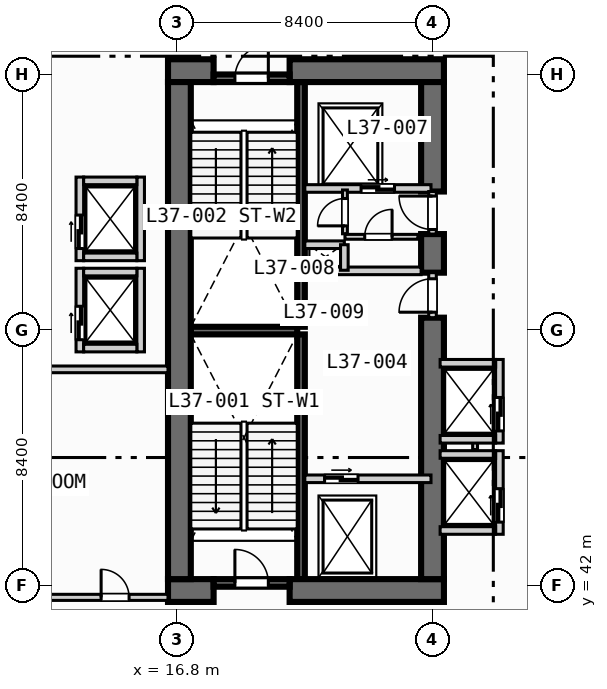
"""IFC4 building model, lengths in metres.
Left out: names, types, materials, properties, quantities, classifications, styles, units other than length and angle.
Written with IfcOpenShell. Run it as: python <this file> out.ifc"""

import sys

from ifc_helpers import new_model, si_unit, direction, frame, frame_2d, origin, place, context, subcontext, project, spatial, rectangle, extrude, element, fill, save


model = new_model("IFC4")
c1 = context("Model", 3, precision=1e-05, world=origin(), true_north=direction((0.0, 1.0)))
c2 = subcontext(c1, "Body", "Model", "MODEL_VIEW")
j1 = project(units=[si_unit("LENGTHUNIT", "METRE"), si_unit("PLANEANGLEUNIT", "RADIAN")], contexts=[c1])
p1 = place(None, origin())
s1 = spatial("IfcSite", under=j1, at=p1, CompositionType="ELEMENT")
p2 = place(p1, origin())
s2 = spatial("IfcBuilding", under=s1, at=p2, CompositionType="ELEMENT")
p3 = place(p2, frame((0.0, 0.0, 153.2)))
s3 = spatial("IfcBuildingStorey", under=s2, at=p3, CompositionType="ELEMENT", Elevation=153.2)
for number, where, z_axis, x_axis in (
    (1, (20.875, 42.2, 0.0), (0.0, 0.0, 1.0), (0.0, 1.0, 0.0)),
    (2, (20.875, 50.5, 0.0), (0.0, 0.0, 1.0), (0.0, 1.0, 0.0)),
):
    element("IfcWall", number, at=place(p3, frame(where, z_axis=z_axis, x_axis=x_axis)), inside=s3, PredefinedType="SOLIDWALL", context=c2, shape_type="SweptSolid", body=[
        extrude(rectangle(XDim=8.05, YDim=0.25, at=frame_2d((4.025, 0.0))), origin(), (0.0, 0.0, 1.0), 4.15),
    ])
p4 = place(p3, frame((17.25, 50.375, 0.0), z_axis=(0.0, 0.0, 1.0), x_axis=(1.0, 0.0, 0.0)))
e3 = element("IfcWall", 3, at=p4, inside=s3, PredefinedType="SOLIDWALL", context=c2, shape_type="SweptSolid", body=[
    extrude(rectangle(XDim=3.5, YDim=0.25, at=frame_2d((1.75, 0.0))), origin(), (0.0, 0.0, 1.0), 4.15),
])
p5 = place(p3, frame((16.5, 41.825, 0.0), z_axis=(0.0, 0.0, 1.0), x_axis=(1.0, 0.0, 0.0)))
e4 = element("IfcWall", 4, at=p5, inside=s3, PredefinedType="SHEAR", context=c2, shape_type="SweptSolid", body=[
    extrude(rectangle(XDim=1.5, YDim=0.75, at=frame_2d((0.75, 0.0))), origin(), (0.0, 0.0, 1.0), 4.15),
])
p6 = place(p3, frame((20.5, 41.825, 0.0), z_axis=(0.0, 0.0, 1.0), x_axis=(1.0, 0.0, 0.0)))
e5 = element("IfcWall", 5, at=p6, inside=s3, PredefinedType="SHEAR", context=c2, shape_type="SweptSolid", body=[
    extrude(rectangle(XDim=5.075, YDim=0.75, at=frame_2d((2.538, 0.0))), origin(), (0.0, 0.0, 1.0), 4.15),
])
p7 = place(p3, frame((16.5, 58.925, 0.0), z_axis=(0.0, 0.0, 1.0), x_axis=(1.0, 0.0, 0.0)))
e6 = element("IfcWall", 6, at=p7, inside=s3, PredefinedType="SHEAR", context=c2, shape_type="SweptSolid", body=[
    extrude(rectangle(XDim=1.5, YDim=0.75, at=frame_2d((0.75, 0.0))), origin(), (0.0, 0.0, 1.0), 4.15),
])
p8 = place(p3, frame((20.5, 58.925, 0.0), z_axis=(0.0, 0.0, 1.0), x_axis=(1.0, 0.0, 0.0)))
e7 = element("IfcWall", 7, at=p8, inside=s3, PredefinedType="SHEAR", context=c2, shape_type="SweptSolid", body=[
    extrude(rectangle(XDim=5.075, YDim=0.75, at=frame_2d((2.538, 0.0))), origin(), (0.0, 0.0, 1.0), 4.15),
])
p9 = place(p3, frame((16.875, 42.2, 0.0), z_axis=(0.0, 0.0, 1.0), x_axis=(0.0, 1.0, 0.0)))
e8 = element("IfcWall", 8, at=p9, inside=s3, PredefinedType="SHEAR", context=c2, shape_type="SweptSolid", body=[
    extrude(rectangle(XDim=16.35, YDim=0.75, at=frame_2d((8.175, 0.0))), origin(), (0.0, 0.0, 1.0), 4.15),
])
p10 = place(p3, frame((25.2, 42.2, 0.0), z_axis=(0.0, 0.0, 1.0), x_axis=(0.0, 1.0, 0.0)))
e9 = element("IfcWall", 9, at=p10, inside=s3, PredefinedType="SHEAR", context=c2, shape_type="SweptSolid", body=[
    extrude(rectangle(XDim=8.6, YDim=0.75, at=frame_2d((4.3, 0.0))), origin(), (0.0, 0.0, 1.0), 4.15),
])
p11 = place(p3, frame((25.2, 52.28, 0.0), z_axis=(0.0, 0.0, 1.0), x_axis=(0.0, 1.0, 0.0)))
e10 = element("IfcWall", 10, at=p11, inside=s3, PredefinedType="SHEAR", context=c2, shape_type="SweptSolid", body=[
    extrude(rectangle(XDim=1.27, YDim=0.75, at=frame_2d((0.635, 0.0))), origin(), (0.0, 0.0, 1.0), 4.15),
])
p12 = place(p3, frame((25.2, 54.95, 0.0), z_axis=(0.0, 0.0, 1.0), x_axis=(0.0, 1.0, 0.0)))
e11 = element("IfcWall", 11, at=p12, inside=s3, PredefinedType="SHEAR", context=c2, shape_type="SweptSolid", body=[
    extrude(rectangle(XDim=3.6, YDim=0.75, at=frame_2d((1.8, 0.0))), origin(), (0.0, 0.0, 1.0), 4.15),
])
p13 = place(p3, frame((18.0, 42.075, 0.0), z_axis=(0.0, 0.0, 1.0), x_axis=(1.0, 0.0, 0.0)))
e12 = element("IfcWall", 12, at=p13, inside=s3, PredefinedType="SOLIDWALL", context=c2, shape_type="SweptSolid", body=[
    extrude(rectangle(XDim=2.5, YDim=0.25, at=frame_2d((1.25, 0.0))), origin(), (0.0, 0.0, 1.0), 4.15),
])
p14 = place(p13, frame((0.7, 0.0, 0.0)))
e13 = element("IfcOpeningElement", 13, at=p14, cuts=e12, PredefinedType="OPENING", context=c2, shape_type="SweptSolid", body=[
    extrude(rectangle(XDim=1.1, YDim=2.15, at=frame_2d((0.55, 1.075))), frame((0.0, 0.135, 0.0), z_axis=(0.0, -1.0, 0.0), x_axis=(1.0, 0.0, 0.0)), (0.0, 0.0, 1.0), 0.27),
])
p15 = place(p3, frame((18.0, 58.675, 0.0), z_axis=(0.0, 0.0, 1.0), x_axis=(1.0, 0.0, 0.0)))
e14 = element("IfcWall", 14, at=p15, inside=s3, PredefinedType="SOLIDWALL", context=c2, shape_type="SweptSolid", body=[
    extrude(rectangle(XDim=2.5, YDim=0.25, at=frame_2d((1.25, 0.0))), origin(), (0.0, 0.0, 1.0), 4.15),
])
p16 = place(p15, frame((0.7, 0.0, 0.0)))
e15 = element("IfcOpeningElement", 15, at=p16, cuts=e14, PredefinedType="OPENING", context=c2, shape_type="SweptSolid", body=[
    extrude(rectangle(XDim=1.1, YDim=2.15, at=frame_2d((0.55, 1.075))), frame((0.0, 0.135, 0.0), z_axis=(0.0, -1.0, 0.0), x_axis=(1.0, 0.0, 0.0)), (0.0, 0.0, 1.0), 0.27),
])
p17 = place(p3, frame((21.0, 45.5, 0.0), z_axis=(0.0, 0.0, 1.0), x_axis=(1.0, 0.0, 0.0)))
e16 = element("IfcWall", 16, at=p17, inside=s3, PredefinedType="SOLIDWALL", context=c2, shape_type="SweptSolid", body=[
    extrude(rectangle(XDim=4.15, YDim=0.25, at=frame_2d((2.075, 0.0))), origin(), (0.0, 0.0, 1.0), 4.15),
])
p18 = place(p17, frame((0.65, 0.0, 0.0)))
e17 = element("IfcOpeningElement", 17, at=p18, cuts=e16, PredefinedType="OPENING", context=c2, shape_type="SweptSolid", body=[
    extrude(rectangle(XDim=1.1, YDim=2.15, at=frame_2d((0.55, 1.075))), frame((0.0, 0.135, 0.0), z_axis=(0.0, -1.0, 0.0), x_axis=(1.0, 0.0, 0.0)), (0.0, 0.0, 1.0), 0.27),
])
p19 = place(p3, frame((25.2, 50.8, 0.0), z_axis=(0.0, 0.0, 1.0), x_axis=(0.0, 1.0, 0.0)))
e18 = element("IfcWall", 18, at=p19, inside=s3, PredefinedType="SOLIDWALL", context=c2, shape_type="SweptSolid", body=[
    extrude(rectangle(XDim=1.48, YDim=0.25, at=frame_2d((0.74, 0.0))), origin(), (0.0, 0.0, 1.0), 4.15),
])
p20 = place(p19, frame((0.18, 0.0, 0.0)))
e19 = element("IfcOpeningElement", 19, at=p20, cuts=e18, PredefinedType="OPENING", context=c2, shape_type="SweptSolid", body=[
    extrude(rectangle(XDim=1.1, YDim=2.15, at=frame_2d((0.55, 1.075))), frame((0.0, 0.135, 0.0), z_axis=(0.0, -1.0, 0.0), x_axis=(1.0, 0.0, 0.0)), (0.0, 0.0, 1.0), 0.27),
])
p21 = place(p3, frame((21.0, 52.34, 0.0), z_axis=(0.0, 0.0, 1.0), x_axis=(1.0, 0.0, 0.0)))
e20 = element("IfcWall", 20, at=p21, inside=s3, PredefinedType="SOLIDWALL", context=c2, shape_type="SweptSolid", body=[
    extrude(rectangle(XDim=3.825, YDim=0.25, at=frame_2d((1.913, 0.0))), origin(), (0.0, 0.0, 1.0), 4.15),
])
p22 = place(p3, frame((21.0, 55.05, 0.0), z_axis=(0.0, 0.0, 1.0), x_axis=(1.0, 0.0, 0.0)))
e21 = element("IfcWall", 21, at=p22, inside=s3, PredefinedType="SOLIDWALL", context=c2, shape_type="SweptSolid", body=[
    extrude(rectangle(XDim=4.15, YDim=0.25, at=frame_2d((2.075, 0.0))), origin(), (0.0, 0.0, 1.0), 4.15),
])
p23 = place(p22, frame((1.85, 0.0, 0.0)))
e22 = element("IfcOpeningElement", 22, at=p23, cuts=e21, PredefinedType="OPENING", context=c2, shape_type="SweptSolid", body=[
    extrude(rectangle(XDim=1.1, YDim=2.15, at=frame_2d((0.55, 1.075))), frame((0.0, 0.135, 0.0), z_axis=(0.0, -1.0, 0.0), x_axis=(1.0, 0.0, 0.0)), (0.0, 0.0, 1.0), 0.27),
])
p24 = place(p3, frame((25.2, 53.55, 0.0), z_axis=(0.0, 0.0, 1.0), x_axis=(0.0, 1.0, 0.0)))
e23 = element("IfcWall", 23, at=p24, inside=s3, PredefinedType="SOLIDWALL", context=c2, shape_type="SweptSolid", body=[
    extrude(rectangle(XDim=1.4, YDim=0.25, at=frame_2d((0.7, 0.0))), origin(), (0.0, 0.0, 1.0), 4.15),
])
p25 = place(p24, frame((0.15, 0.0, 0.0)))
e24 = element("IfcOpeningElement", 24, at=p25, cuts=e23, PredefinedType="OPENING", context=c2, shape_type="SweptSolid", body=[
    extrude(rectangle(XDim=1.1, YDim=2.15, at=frame_2d((0.55, 1.075))), frame((0.0, 0.135, 0.0), z_axis=(0.0, -1.0, 0.0), x_axis=(1.0, 0.0, 0.0)), (0.0, 0.0, 1.0), 0.27),
])
p26 = place(p3, frame((21.0, 53.2, 0.0), z_axis=(0.0, 0.0, 1.0), x_axis=(1.0, 0.0, 0.0)))
e25 = element("IfcWall", 25, at=p26, inside=s3, PredefinedType="SOLIDWALL", context=c2, shape_type="SweptSolid", body=[
    extrude(rectangle(XDim=1.3, YDim=0.25, at=frame_2d((0.65, 0.0))), origin(), (0.0, 0.0, 1.0), 4.15),
])
p27 = place(p3, frame((22.3, 52.36, 0.0), z_axis=(0.0, 0.0, 1.0), x_axis=(0.0, 1.0, 0.0)))
e26 = element("IfcWall", 26, at=p27, inside=s3, PredefinedType="SOLIDWALL", context=c2, shape_type="SweptSolid", body=[
    extrude(rectangle(XDim=0.84, YDim=0.25, at=frame_2d((0.42, 0.0))), origin(), (0.0, 0.0, 1.0), 4.15),
])
p28 = place(p3, frame((22.32, 53.56, 0.0), z_axis=(0.0, 0.0, 1.0), x_axis=(0.0, 1.0, 0.0)))
e27 = element("IfcWall", 27, at=p28, inside=s3, PredefinedType="PARTITIONING", context=c2, shape_type="SweptSolid", body=[
    extrude(rectangle(XDim=1.44, YDim=0.16, at=frame_2d((0.72, 0.0))), origin(), (0.0, 0.0, 1.0), 4.15),
])
p29 = place(p28, frame((0.26, 0.0, 0.0)))
e28 = element("IfcOpeningElement", 28, at=p29, cuts=e27, PredefinedType="OPENING", context=c2, shape_type="SweptSolid", body=[
    extrude(rectangle(XDim=0.9, YDim=2.1, at=frame_2d((0.45, 1.05))), frame((0.0, 0.09, 0.0), z_axis=(0.0, -1.0, 0.0), x_axis=(1.0, 0.0, 0.0)), (0.0, 0.0, 1.0), 0.18),
])
p30 = place(p3, frame((22.32, 53.46, 0.0), z_axis=(0.0, 0.0, 1.0), x_axis=(1.0, 0.0, 0.0)))
e29 = element("IfcWall", 29, at=p30, inside=s3, PredefinedType="PARTITIONING", context=c2, shape_type="SweptSolid", body=[
    extrude(rectangle(XDim=2.4, YDim=0.16, at=frame_2d((1.2, 0.0))), origin(), (0.0, 0.0, 1.0), 4.15),
])
p31 = place(p30, frame((0.65, 0.0, 0.0)))
e30 = element("IfcOpeningElement", 30, at=p31, cuts=e29, PredefinedType="OPENING", context=c2, shape_type="SweptSolid", body=[
    extrude(rectangle(XDim=0.9, YDim=2.1, at=frame_2d((0.45, 1.05))), frame((0.0, 0.09, 0.0), z_axis=(0.0, -1.0, 0.0), x_axis=(1.0, 0.0, 0.0)), (0.0, 0.0, 1.0), 0.18),
])
p32 = place(p3, frame((13.6, 49.675, 0.0), z_axis=(0.0, 0.0, 1.0), x_axis=(0.0, 1.0, 0.0)))
e31 = element("IfcWall", 31, at=p32, inside=s3, PredefinedType="SOLIDWALL", context=c2, shape_type="SweptSolid", body=[
    extrude(rectangle(XDim=2.75, YDim=0.25, at=frame_2d((1.375, 0.0))), origin(), (0.0, 0.0, 1.0), 4.15),
])
p33 = place(p32, frame((0.4, 0.0, 0.0)))
e32 = element("IfcOpeningElement", 32, at=p33, cuts=e31, PredefinedType="OPENING", context=c2, shape_type="SweptSolid", body=[
    extrude(rectangle(XDim=1.1, YDim=2.15, at=frame_2d((0.55, 1.075))), frame((0.0, 0.135, 0.0), z_axis=(0.0, -1.0, 0.0), x_axis=(1.0, 0.0, 0.0)), (0.0, 0.0, 1.0), 0.27),
])
p34 = place(p3, frame((15.6, 49.675, 0.0), z_axis=(0.0, 0.0, 1.0), x_axis=(0.0, 1.0, 0.0)))
e33 = element("IfcWall", 33, at=p34, inside=s3, PredefinedType="SOLIDWALL", context=c2, shape_type="SweptSolid", body=[
    extrude(rectangle(XDim=2.75, YDim=0.25, at=frame_2d((1.375, 0.0))), origin(), (0.0, 0.0, 1.0), 4.15),
])
for number, where, z_axis, x_axis in (
    (34, (13.725, 49.8, 0.0), (0.0, 0.0, 1.0), (1.0, 0.0, 0.0)),
    (35, (13.725, 52.3, 0.0), (0.0, 0.0, 1.0), (1.0, 0.0, 0.0)),
):
    element("IfcWall", number, at=place(p3, frame(where, z_axis=z_axis, x_axis=x_axis)), inside=s3, PredefinedType="SOLIDWALL", context=c2, shape_type="SweptSolid", body=[
        extrude(rectangle(XDim=1.75, YDim=0.25, at=frame_2d((0.875, 0.0))), origin(), (0.0, 0.0, 1.0), 4.15),
    ])
p35 = place(p3, frame((13.6, 52.675, 0.0), z_axis=(0.0, 0.0, 1.0), x_axis=(0.0, 1.0, 0.0)))
e36 = element("IfcWall", 36, at=p35, inside=s3, PredefinedType="SOLIDWALL", context=c2, shape_type="SweptSolid", body=[
    extrude(rectangle(XDim=2.75, YDim=0.25, at=frame_2d((1.375, 0.0))), origin(), (0.0, 0.0, 1.0), 4.15),
])
p36 = place(p35, frame((0.4, 0.0, 0.0)))
e37 = element("IfcOpeningElement", 37, at=p36, cuts=e36, PredefinedType="OPENING", context=c2, shape_type="SweptSolid", body=[
    extrude(rectangle(XDim=1.1, YDim=2.15, at=frame_2d((0.55, 1.075))), frame((0.0, 0.135, 0.0), z_axis=(0.0, -1.0, 0.0), x_axis=(1.0, 0.0, 0.0)), (0.0, 0.0, 1.0), 0.27),
])
p37 = place(p3, frame((15.6, 52.675, 0.0), z_axis=(0.0, 0.0, 1.0), x_axis=(0.0, 1.0, 0.0)))
e38 = element("IfcWall", 38, at=p37, inside=s3, PredefinedType="SOLIDWALL", context=c2, shape_type="SweptSolid", body=[
    extrude(rectangle(XDim=2.75, YDim=0.25, at=frame_2d((1.375, 0.0))), origin(), (0.0, 0.0, 1.0), 4.15),
])
for number, where, z_axis, x_axis in (
    (39, (13.725, 52.8, 0.0), (0.0, 0.0, 1.0), (1.0, 0.0, 0.0)),
    (40, (13.725, 55.3, 0.0), (0.0, 0.0, 1.0), (1.0, 0.0, 0.0)),
):
    element("IfcWall", number, at=place(p3, frame(where, z_axis=z_axis, x_axis=x_axis)), inside=s3, PredefinedType="SOLIDWALL", context=c2, shape_type="SweptSolid", body=[
        extrude(rectangle(XDim=1.75, YDim=0.25, at=frame_2d((0.875, 0.0))), origin(), (0.0, 0.0, 1.0), 4.15),
    ])
p38 = place(p3, frame((27.4, 43.675, 0.0), z_axis=(0.0, 0.0, 1.0), x_axis=(0.0, 1.0, 0.0)))
e41 = element("IfcWall", 41, at=p38, inside=s3, PredefinedType="SOLIDWALL", context=c2, shape_type="SweptSolid", body=[
    extrude(rectangle(XDim=2.75, YDim=0.25, at=frame_2d((1.375, 0.0))), origin(), (0.0, 0.0, 1.0), 4.15),
])
p39 = place(p38, frame((0.4, 0.0, 0.0)))
e42 = element("IfcOpeningElement", 42, at=p39, cuts=e41, PredefinedType="OPENING", context=c2, shape_type="SweptSolid", body=[
    extrude(rectangle(XDim=1.1, YDim=2.15, at=frame_2d((0.55, 1.075))), frame((0.0, 0.135, 0.0), z_axis=(0.0, -1.0, 0.0), x_axis=(1.0, 0.0, 0.0)), (0.0, 0.0, 1.0), 0.27),
])
for number, where, z_axis, x_axis in (
    (43, (25.45, 43.8, 0.0), (0.0, 0.0, 1.0), (1.0, 0.0, 0.0)),
    (44, (25.45, 46.3, 0.0), (0.0, 0.0, 1.0), (1.0, 0.0, 0.0)),
):
    element("IfcWall", number, at=place(p3, frame(where, z_axis=z_axis, x_axis=x_axis)), inside=s3, PredefinedType="SOLIDWALL", context=c2, shape_type="SweptSolid", body=[
        extrude(rectangle(XDim=1.825, YDim=0.25, at=frame_2d((0.913, 0.0))), origin(), (0.0, 0.0, 1.0), 4.15),
    ])
p40 = place(p3, frame((26.6, 46.46, 0.0), z_axis=(0.0, 0.0, 1.0), x_axis=(0.0, 1.0, 0.0)))
e45 = element("IfcWall", 45, at=p40, inside=s3, PredefinedType="PARTITIONING", context=c2, shape_type="SweptSolid", body=[
    extrude(rectangle(XDim=0.88, YDim=0.16, at=frame_2d((0.44, 0.0))), origin(), (0.0, 0.0, 1.0), 4.15),
])
p41 = place(p3, frame((27.4, 46.675, 0.0), z_axis=(0.0, 0.0, 1.0), x_axis=(0.0, 1.0, 0.0)))
e46 = element("IfcWall", 46, at=p41, inside=s3, PredefinedType="SOLIDWALL", context=c2, shape_type="SweptSolid", body=[
    extrude(rectangle(XDim=2.75, YDim=0.25, at=frame_2d((1.375, 0.0))), origin(), (0.0, 0.0, 1.0), 4.15),
])
p42 = place(p41, frame((0.4, 0.0, 0.0)))
e47 = element("IfcOpeningElement", 47, at=p42, cuts=e46, PredefinedType="OPENING", context=c2, shape_type="SweptSolid", body=[
    extrude(rectangle(XDim=1.1, YDim=2.15, at=frame_2d((0.55, 1.075))), frame((0.0, 0.135, 0.0), z_axis=(0.0, -1.0, 0.0), x_axis=(1.0, 0.0, 0.0)), (0.0, 0.0, 1.0), 0.27),
])
for number, where, z_axis, x_axis in (
    (48, (25.45, 46.8, 0.0), (0.0, 0.0, 1.0), (1.0, 0.0, 0.0)),
    (49, (25.45, 49.3, 0.0), (0.0, 0.0, 1.0), (1.0, 0.0, 0.0)),
):
    element("IfcWall", number, at=place(p3, frame(where, z_axis=z_axis, x_axis=x_axis)), inside=s3, PredefinedType="SOLIDWALL", context=c2, shape_type="SweptSolid", body=[
        extrude(rectangle(XDim=1.825, YDim=0.25, at=frame_2d((0.913, 0.0))), origin(), (0.0, 0.0, 1.0), 4.15),
    ])
p43 = place(p3, frame((0.3, 41.6, 0.0), z_axis=(0.0, 0.0, 1.0), x_axis=(1.0, 0.0, 0.0)))
e50 = element("IfcWall", 50, at=p43, inside=s3, PredefinedType="PARTITIONING", context=c2, shape_type="SweptSolid", body=[
    extrude(rectangle(XDim=16.2, YDim=0.2, at=frame_2d((8.1, 0.0))), origin(), (0.0, 0.0, 1.0), 4.15),
])
p44 = place(p43, frame((14.0, 0.0, 0.0)))
e51 = element("IfcOpeningElement", 51, at=p44, cuts=e50, PredefinedType="OPENING", context=c2, shape_type="SweptSolid", body=[
    extrude(rectangle(XDim=0.92, YDim=2.1, at=frame_2d((0.46, 1.05))), frame((0.0, 0.11, 0.0), z_axis=(0.0, -1.0, 0.0), x_axis=(1.0, 0.0, 0.0)), (0.0, 0.0, 1.0), 0.22),
])
p45 = place(p3, frame((0.3, 49.1, 0.0), z_axis=(0.0, 0.0, 1.0), x_axis=(1.0, 0.0, 0.0)))
e52 = element("IfcWall", 52, at=p45, inside=s3, PredefinedType="PARTITIONING", context=c2, shape_type="SweptSolid", body=[
    extrude(rectangle(XDim=16.2, YDim=0.22, at=frame_2d((8.1, 0.0))), origin(), (0.0, 0.0, 1.0), 4.15),
])
p46 = place(p14, origin())
e53 = element("IfcDoor", 53, at=p46, inside=s3, OperationType="SINGLE_SWING_LEFT", PredefinedType="DOOR", context=c2, shape_type="SweptSolid", body=[
    extrude(rectangle(XDim=1.1, YDim=2.15, at=frame_2d((0.55, 1.075))), frame((0.0, 0.025, 0.0), z_axis=(0.0, -1.0, 0.0), x_axis=(1.0, 0.0, 0.0)), (0.0, 0.0, 1.0), 0.05),
])
fill(e13, e53)
p47 = place(p16, origin())
e54 = element("IfcDoor", 54, at=p47, inside=s3, OperationType="SINGLE_SWING_RIGHT", PredefinedType="DOOR", context=c2, shape_type="SweptSolid", body=[
    extrude(rectangle(XDim=1.1, YDim=2.15, at=frame_2d((0.55, 1.075))), frame((0.0, 0.025, 0.0), z_axis=(0.0, -1.0, 0.0), x_axis=(1.0, 0.0, 0.0)), (0.0, 0.0, 1.0), 0.05),
])
fill(e15, e54)
p48 = place(p18, origin())
e55 = element("IfcDoor", 55, at=p48, inside=s3, OperationType="SLIDING_TO_LEFT", PredefinedType="DOOR", context=c2, shape_type="SweptSolid", body=[
    extrude(rectangle(XDim=1.1, YDim=2.15, at=frame_2d((0.55, 1.075))), frame((0.0, 0.025, 0.0), z_axis=(0.0, -1.0, 0.0), x_axis=(1.0, 0.0, 0.0)), (0.0, 0.0, 1.0), 0.05),
])
fill(e17, e55)
p49 = place(p20, origin())
e56 = element("IfcDoor", 56, at=p49, inside=s3, OperationType="SINGLE_SWING_LEFT", PredefinedType="DOOR", context=c2, shape_type="SweptSolid", body=[
    extrude(rectangle(XDim=1.1, YDim=2.15, at=frame_2d((0.55, 1.075))), frame((0.0, 0.025, 0.0), z_axis=(0.0, -1.0, 0.0), x_axis=(1.0, 0.0, 0.0)), (0.0, 0.0, 1.0), 0.05),
])
fill(e19, e56)
p50 = place(p23, origin())
e57 = element("IfcDoor", 57, at=p50, inside=s3, OperationType="SLIDING_TO_LEFT", PredefinedType="DOOR", context=c2, shape_type="SweptSolid", body=[
    extrude(rectangle(XDim=1.1, YDim=2.15, at=frame_2d((0.55, 1.075))), frame((0.0, 0.025, 0.0), z_axis=(0.0, -1.0, 0.0), x_axis=(1.0, 0.0, 0.0)), (0.0, 0.0, 1.0), 0.05),
])
fill(e22, e57)
p51 = place(p25, origin())
e58 = element("IfcDoor", 58, at=p51, inside=s3, OperationType="SINGLE_SWING_RIGHT", PredefinedType="DOOR", context=c2, shape_type="SweptSolid", body=[
    extrude(rectangle(XDim=1.1, YDim=2.15, at=frame_2d((0.55, 1.075))), frame((0.0, 0.025, 0.0), z_axis=(0.0, -1.0, 0.0), x_axis=(1.0, 0.0, 0.0)), (0.0, 0.0, 1.0), 0.05),
])
fill(e24, e58)
p52 = place(p29, origin())
e59 = element("IfcDoor", 59, at=p52, inside=s3, OperationType="SINGLE_SWING_LEFT", PredefinedType="DOOR", context=c2, shape_type="SweptSolid", body=[
    extrude(rectangle(XDim=0.9, YDim=2.1, at=frame_2d((0.45, 1.05))), frame((0.0, 0.025, 0.0), z_axis=(0.0, -1.0, 0.0), x_axis=(1.0, 0.0, 0.0)), (0.0, 0.0, 1.0), 0.05),
])
fill(e28, e59)
p53 = place(p31, origin())
e60 = element("IfcDoor", 60, at=p53, inside=s3, OperationType="SINGLE_SWING_RIGHT", PredefinedType="DOOR", context=c2, shape_type="SweptSolid", body=[
    extrude(rectangle(XDim=0.9, YDim=2.1, at=frame_2d((0.45, 1.05))), frame((0.0, 0.025, 0.0), z_axis=(0.0, -1.0, 0.0), x_axis=(1.0, 0.0, 0.0)), (0.0, 0.0, 1.0), 0.05),
])
fill(e30, e60)
p54 = place(p33, origin())
e61 = element("IfcDoor", 61, at=p54, inside=s3, OperationType="SLIDING_TO_LEFT", PredefinedType="DOOR", context=c2, shape_type="SweptSolid", body=[
    extrude(rectangle(XDim=1.1, YDim=2.15, at=frame_2d((0.55, 1.075))), frame((0.0, 0.025, 0.0), z_axis=(0.0, -1.0, 0.0), x_axis=(1.0, 0.0, 0.0)), (0.0, 0.0, 1.0), 0.05),
])
fill(e32, e61)
p55 = place(p36, origin())
e62 = element("IfcDoor", 62, at=p55, inside=s3, OperationType="SLIDING_TO_LEFT", PredefinedType="DOOR", context=c2, shape_type="SweptSolid", body=[
    extrude(rectangle(XDim=1.1, YDim=2.15, at=frame_2d((0.55, 1.075))), frame((0.0, 0.025, 0.0), z_axis=(0.0, -1.0, 0.0), x_axis=(1.0, 0.0, 0.0)), (0.0, 0.0, 1.0), 0.05),
])
fill(e37, e62)
p56 = place(p39, origin())
e63 = element("IfcDoor", 63, at=p56, inside=s3, OperationType="SLIDING_TO_LEFT", PredefinedType="DOOR", context=c2, shape_type="SweptSolid", body=[
    extrude(rectangle(XDim=1.1, YDim=2.15, at=frame_2d((0.55, 1.075))), frame((0.0, 0.025, 0.0), z_axis=(0.0, -1.0, 0.0), x_axis=(1.0, 0.0, 0.0)), (0.0, 0.0, 1.0), 0.05),
])
fill(e42, e63)
p57 = place(p42, origin())
e64 = element("IfcDoor", 64, at=p57, inside=s3, OperationType="SLIDING_TO_LEFT", PredefinedType="DOOR", context=c2, shape_type="SweptSolid", body=[
    extrude(rectangle(XDim=1.1, YDim=2.15, at=frame_2d((0.55, 1.075))), frame((0.0, 0.025, 0.0), z_axis=(0.0, -1.0, 0.0), x_axis=(1.0, 0.0, 0.0)), (0.0, 0.0, 1.0), 0.05),
])
fill(e47, e64)
p58 = place(p44, origin())
e65 = element("IfcDoor", 65, at=p58, inside=s3, OperationType="SINGLE_SWING_LEFT", PredefinedType="DOOR", context=c2, shape_type="SweptSolid", body=[
    extrude(rectangle(XDim=0.92, YDim=2.1, at=frame_2d((0.46, 1.05))), frame((0.0, 0.025, 0.0), z_axis=(0.0, -1.0, 0.0), x_axis=(1.0, 0.0, 0.0)), (0.0, 0.0, 1.0), 0.05),
])
fill(e51, e65)
save(model, sys.argv[1])
